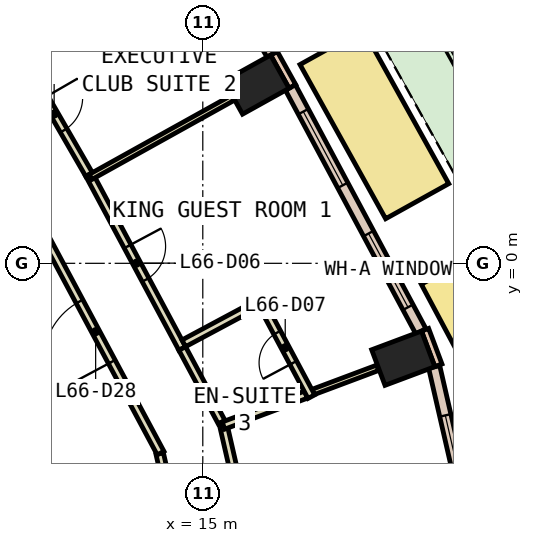
"""IFC4 building model, lengths in metres.
Left out: names, types, materials, properties, quantities, classifications, styles, units other than length and angle.
Written with IfcOpenShell. Run it as: python <this file> out.ifc"""

import sys

from ifc_helpers import new_model, si_unit, direction, frame, frame_2d, origin, origin_2d, place, context, subcontext, project, spatial, rectangle, extrude, element, fill, save


model = new_model("IFC4")
c1 = context("Model", 3, precision=1e-05, world=origin(), true_north=direction((0.0, 1.0)))
c2 = subcontext(c1, "Body", "Model", "MODEL_VIEW")
j1 = project(units=[si_unit("LENGTHUNIT", "METRE"), si_unit("PLANEANGLEUNIT", "RADIAN")], contexts=[c1])
p1 = place(None, origin())
s1 = spatial("IfcSite", under=j1, at=p1, CompositionType="ELEMENT")
p2 = place(p1, origin())
s2 = spatial("IfcBuilding", under=s1, at=p2, CompositionType="ELEMENT")
p3 = place(p2, frame((0.0, 0.0, 286.4)))
s3 = spatial("IfcBuildingStorey", under=s2, at=p3, CompositionType="ELEMENT", Elevation=286.4)
for number, where, z_axis, x_axis in (
    (1, (20.275, -2.497, 0.0), (0.0, 0.0, 1.0), (-0.351, 0.936, 0.0)),
    (2, (16.415, 4.702, 0.0), (0.0, 0.0, 1.0), (-0.486, 0.874, 0.0)),
):
    element("IfcColumn", number, at=place(p3, frame(where, z_axis=z_axis, x_axis=x_axis)), inside=s3, PredefinedType="COLUMN", context=c2, shape_type="SweptSolid", body=[
        extrude(rectangle(XDim=1.0, YDim=1.4, at=origin_2d()), origin(), (0.0, 0.0, 1.0), 3.26),
    ])
p4 = place(p3, frame((6.279, -3.625, -0.6), z_axis=(0.0, 0.0, 1.0), x_axis=(0.866017533419, -0.500013631625, 0.0)))
e3 = element("IfcWall", 3, at=p4, inside=s3, PredefinedType="SHEAR", context=c2, shape_type="SweptSolid", body=[
    extrude(rectangle(XDim=9.0, YDim=0.8, at=frame_2d((4.5, 0.0))), origin(), (0.0, 0.0, 1.0), 3.86),
])
p5 = place(p3, frame((21.2, -2.684, 0.0), z_axis=(0.0, 0.0, 1.0), x_axis=(-0.350962844851, 0.936389385637, 0.0)))
e4 = element("IfcWall", 4, at=p5, inside=s3, PredefinedType="STANDARD", context=c2, shape_type="SweptSolid", body=[
    extrude(rectangle(XDim=1.0, YDim=0.2, at=frame_2d((0.5, 0.0))), origin(), (0.0, 0.0, 1.0), 3.26),
])
p6 = place(p3, frame((17.358, 4.653, 0.0), z_axis=(0.0, 0.0, 1.0), x_axis=(-0.485850211157, 0.874042088414, 0.0)))
e5 = element("IfcWall", 5, at=p6, inside=s3, PredefinedType="STANDARD", context=c2, shape_type="SweptSolid", body=[
    extrude(rectangle(XDim=1.0, YDim=0.2, at=frame_2d((0.5, 0.0))), origin(), (0.0, 0.0, 1.0), 3.26),
])
p7 = place(p3, frame((21.987, -6.642, 0.0), z_axis=(0.0, 0.0, 1.0), x_axis=(-0.223448307338, 0.974715781112, 0.0)))
e6 = element("IfcWall", 6, at=p7, inside=s3, PredefinedType="STANDARD", context=c2, shape_type="SweptSolid", body=[
    extrude(rectangle(XDim=4.019, YDim=0.3, at=frame_2d((2.009, 0.0))), origin(), (0.0, 0.0, 1.0), 3.26),
])
p8 = place(p7, frame((1.309, 0.0, 0.9)))
e7 = element("IfcOpeningElement", 7, at=p8, cuts=e6, PredefinedType="OPENING", context=c2, shape_type="SweptSolid", body=[
    extrude(rectangle(XDim=1.4, YDim=2.0, at=frame_2d((0.7, 1.0))), frame((0.0, 0.16, 0.0), z_axis=(0.0, -1.0, 0.0), x_axis=(1.0, 0.0, 0.0)), (0.0, 0.0, 1.0), 0.32),
])
p9 = place(p3, frame((20.739, -1.79, 0.0), z_axis=(0.0, 0.0, 1.0), x_axis=(-0.471789353675, 0.881711293882, 0.0)))
e8 = element("IfcWall", 8, at=p9, inside=s3, PredefinedType="STANDARD", context=c2, shape_type="SweptSolid", body=[
    extrude(rectangle(XDim=7.277, YDim=0.3, at=frame_2d((3.638, 0.0))), origin(), (0.0, 0.0, 1.0), 3.26),
])
p10 = place(p9, frame((0.719, 0.0, 0.9)))
e9 = element("IfcOpeningElement", 9, at=p10, cuts=e8, PredefinedType="OPENING", context=c2, shape_type="SweptSolid", body=[
    extrude(rectangle(XDim=2.2, YDim=2.0, at=frame_2d((1.1, 1.0))), frame((0.0, 0.16, 0.0), z_axis=(0.0, -1.0, 0.0), x_axis=(1.0, 0.0, 0.0)), (0.0, 0.0, 1.0), 0.32),
])
p11 = place(p9, frame((4.358, 0.0, 0.9)))
e10 = element("IfcOpeningElement", 10, at=p11, cuts=e8, PredefinedType="OPENING", context=c2, shape_type="SweptSolid", body=[
    extrude(rectangle(XDim=2.2, YDim=2.0, at=frame_2d((1.1, 1.0))), frame((0.0, 0.16, 0.0), z_axis=(0.0, -1.0, 0.0), x_axis=(1.0, 0.0, 0.0)), (0.0, 0.0, 1.0), 0.32),
])
p12 = place(p3, frame((16.821, 5.498, 0.0), z_axis=(0.0, 0.0, 1.0), x_axis=(-0.499945412946, 0.866056917341, 0.0)))
e11 = element("IfcWall", 11, at=p12, inside=s3, PredefinedType="STANDARD", context=c2, shape_type="SweptSolid", body=[
    extrude(rectangle(XDim=7.299, YDim=0.3, at=frame_2d((3.649, 0.0))), origin(), (0.0, 0.0, 1.0), 3.26),
])
p13 = place(p12, frame((0.825, 0.0, 0.0)))
e12 = element("IfcOpeningElement", 12, at=p13, cuts=e11, PredefinedType="OPENING", context=c2, shape_type="SweptSolid", body=[
    extrude(rectangle(XDim=2.0, YDim=2.4, at=frame_2d((1.0, 1.2))), frame((0.0, 0.16, 0.0), z_axis=(0.0, -1.0, 0.0), x_axis=(1.0, 0.0, 0.0)), (0.0, 0.0, 1.0), 0.32),
])
p14 = place(p12, frame((4.374, 0.0, 0.9)))
e13 = element("IfcOpeningElement", 13, at=p14, cuts=e11, PredefinedType="OPENING", context=c2, shape_type="SweptSolid", body=[
    extrude(rectangle(XDim=2.2, YDim=2.0, at=frame_2d((1.1, 1.0))), frame((0.0, 0.16, 0.0), z_axis=(0.0, -1.0, 0.0), x_axis=(1.0, 0.0, 0.0)), (0.0, 0.0, 1.0), 0.32),
])
p15 = place(p3, frame((23.847, -4.337, 0.0), z_axis=(0.0, 0.0, 1.0), x_axis=(-0.470902401725, 0.882185313894, 0.0)))
e14 = element("IfcWall", 14, at=p15, inside=s3, PredefinedType="STANDARD", context=c2, shape_type="SweptSolid", body=[
    extrude(rectangle(XDim=4.799, YDim=1.9, at=frame_2d((2.4, 0.0))), origin(), (0.0, 0.0, 1.0), 0.8),
])
p16 = place(p3, frame((20.642, 1.634, 0.0), z_axis=(0.0, 0.0, 1.0), x_axis=(-0.485696527213, 0.874127498397, 0.0)))
e15 = element("IfcWall", 15, at=p16, inside=s3, PredefinedType="STANDARD", context=c2, shape_type="SweptSolid", body=[
    extrude(rectangle(XDim=4.641, YDim=1.9, at=frame_2d((2.321, 0.0))), origin(), (0.0, 0.0, 1.0), 0.8),
])
p17 = place(p3, frame((14.335, -7.052, 0.0), z_axis=(0.0, 0.0, 1.0), x_axis=(-0.22355315143, 0.974691740237, 0.0)))
e16 = element("IfcWall", 16, at=p17, inside=s3, PredefinedType="PARTITIONING", context=c2, shape_type="SweptSolid", body=[
    extrude(rectangle(XDim=2.102, YDim=0.2, at=frame_2d((1.051, 0.0))), origin(), (0.0, 0.0, 1.0), 3.26),
])
p18 = place(p3, frame((13.89, -4.994, 0.0), z_axis=(0.0, 0.0, 1.0), x_axis=(-0.471713767504, 0.881751734644, 0.0)))
e17 = element("IfcWall", 17, at=p18, inside=s3, PredefinedType="PARTITIONING", context=c2, shape_type="SweptSolid", body=[
    extrude(rectangle(XDim=7.248, YDim=0.2, at=frame_2d((3.624, 0.0))), origin(), (0.0, 0.0, 1.0), 3.26),
])
p19 = place(p18, frame((2.724, 0.0, 0.0)))
e18 = element("IfcOpeningElement", 18, at=p19, cuts=e17, PredefinedType="OPENING", context=c2, shape_type="SweptSolid", body=[
    extrude(rectangle(XDim=1.8, YDim=2.1, at=frame_2d((0.9, 1.05))), frame((0.0, 0.11, 0.0), z_axis=(0.0, -1.0, 0.0), x_axis=(1.0, 0.0, 0.0)), (0.0, 0.0, 1.0), 0.22),
])
p20 = place(p3, frame((15.521, -4.171, 0.0), z_axis=(0.0, 0.0, 1.0), x_axis=(0.223416387785, -0.974723097946, 0.0)))
e19 = element("IfcWall", 19, at=p20, inside=s3, PredefinedType="PARTITIONING", context=c2, shape_type="SweptSolid", body=[
    extrude(rectangle(XDim=3.003, YDim=0.2, at=frame_2d((1.501, 0.0))), origin(), (0.0, 0.0, 1.0), 3.26),
])
p21 = place(p3, frame((12.009, 2.338, 0.0), z_axis=(0.0, 0.0, 1.0), x_axis=(0.471771260231, -0.88172097515, 0.0)))
e20 = element("IfcWall", 20, at=p21, inside=s3, PredefinedType="PARTITIONING", context=c2, shape_type="SweptSolid", body=[
    extrude(rectangle(XDim=5.193, YDim=0.2, at=frame_2d((2.597, 0.0))), origin(), (0.0, 0.0, 1.0), 3.26),
])
p22 = place(p21, frame((2.146, 0.0, 0.0)))
e21 = element("IfcOpeningElement", 21, at=p22, cuts=e20, PredefinedType="OPENING", context=c2, shape_type="SweptSolid", body=[
    extrude(rectangle(XDim=1.0, YDim=2.1, at=frame_2d((0.5, 1.05))), frame((0.0, 0.11, 0.0), z_axis=(0.0, -1.0, 0.0), x_axis=(1.0, 0.0, 0.0)), (0.0, 0.0, 1.0), 0.22),
])
p23 = place(p3, frame((14.459, -2.241, 0.0), z_axis=(0.0, 0.0, 1.0), x_axis=(0.471648235011, -0.881786789656, 0.0)))
e22 = element("IfcWall", 22, at=p23, inside=s3, PredefinedType="PARTITIONING", context=c2, shape_type="SweptSolid", body=[
    extrude(rectangle(XDim=2.199, YDim=0.2, at=frame_2d((1.1, 0.0))), origin(), (0.0, 0.0, 1.0), 3.26),
])
p24 = place(p3, frame((10.17, 5.519, 0.0), z_axis=(0.0, 0.0, 1.0), x_axis=(0.499990860175, -0.866030680601, 0.0)))
e23 = element("IfcWall", 23, at=p24, inside=s3, PredefinedType="PARTITIONING", context=c2, shape_type="SweptSolid", body=[
    extrude(rectangle(XDim=3.674, YDim=0.2, at=frame_2d((1.837, 0.0))), origin(), (0.0, 0.0, 1.0), 3.26),
])
p25 = place(p24, frame((1.337, 0.0, 0.0)))
e24 = element("IfcOpeningElement", 24, at=p25, cuts=e23, PredefinedType="OPENING", context=c2, shape_type="SweptSolid", body=[
    extrude(rectangle(XDim=1.0, YDim=2.1, at=frame_2d((0.5, 1.05))), frame((0.0, 0.11, 0.0), z_axis=(0.0, -1.0, 0.0), x_axis=(1.0, 0.0, 0.0)), (0.0, 0.0, 1.0), 0.22),
])
p26 = place(p3, frame((17.904, -3.385, 0.0), z_axis=(0.0, 0.0, 1.0), x_axis=(0.936401128709, 0.350931512054, 0.0)))
e25 = element("IfcWall", 25, at=p26, inside=s3, PredefinedType="PARTITIONING", context=c2, shape_type="SweptSolid", body=[
    extrude(rectangle(XDim=1.812, YDim=0.15, at=frame_2d((0.906, 0.0))), origin(), (0.0, 0.0, 1.0), 3.26),
])
p27 = place(p3, frame((15.544, -4.269, 0.0), z_axis=(0.0, 0.0, 1.0), x_axis=(0.936463142424, 0.350765994477, 0.0)))
e26 = element("IfcWall", 26, at=p27, inside=s3, PredefinedType="PARTITIONING", context=c2, shape_type="SweptSolid", body=[
    extrude(rectangle(XDim=2.321, YDim=0.2, at=frame_2d((1.16, 0.0))), origin(), (0.0, 0.0, 1.0), 3.26),
])
p28 = place(p3, frame((17.857, -3.508, 0.0), z_axis=(0.0, 0.0, 1.0), x_axis=(-0.47112614664, 0.882065844454, 0.0)))
e27 = element("IfcWall", 27, at=p28, inside=s3, PredefinedType="PARTITIONING", context=c2, shape_type="SweptSolid", body=[
    extrude(rectangle(XDim=2.921, YDim=0.2, at=frame_2d((1.46, 0.0))), origin(), (0.0, 0.0, 1.0), 3.26),
])
p29 = place(p28, frame((1.01, 0.0, 0.0)))
e28 = element("IfcOpeningElement", 28, at=p29, cuts=e27, PredefinedType="OPENING", context=c2, shape_type="SweptSolid", body=[
    extrude(rectangle(XDim=0.9, YDim=2.1, at=frame_2d((0.45, 1.05))), frame((0.0, 0.11, 0.0), z_axis=(0.0, -1.0, 0.0), x_axis=(1.0, 0.0, 0.0)), (0.0, 0.0, 1.0), 0.22),
])
p30 = place(p3, frame((16.44, -1.067, 0.0), z_axis=(0.0, 0.0, 1.0), x_axis=(-0.881700916894, -0.471808746367, 0.0)))
e29 = element("IfcWall", 29, at=p30, inside=s3, PredefinedType="PARTITIONING", context=c2, shape_type="SweptSolid", body=[
    extrude(rectangle(XDim=2.2, YDim=0.2, at=frame_2d((1.1, 0.0))), origin(), (0.0, 0.0, 1.0), 3.26),
])
p31 = place(p3, frame((12.045, 2.272, 0.0), z_axis=(0.0, 0.0, 1.0), x_axis=(0.873982340973, 0.485957680943, 0.0)))
e30 = element("IfcWall", 30, at=p31, inside=s3, PredefinedType="PARTITIONING", context=c2, shape_type="SweptSolid", body=[
    extrude(rectangle(XDim=4.28, YDim=0.15, at=frame_2d((2.14, 0.0))), origin(), (0.0, 0.0, 1.0), 3.26),
])
p32 = place(p3, frame((10.306, 5.482, 0.0), z_axis=(0.0, 0.0, 1.0), x_axis=(0.866100915363, 0.499869187296, 0.0)))
e31 = element("IfcWall", 31, at=p32, inside=s3, PredefinedType="PARTITIONING", context=c2, shape_type="SweptSolid", body=[
    extrude(rectangle(XDim=2.401, YDim=0.2, at=frame_2d((1.2, 0.0))), origin(), (0.0, 0.0, 1.0), 3.26),
])
p33 = place(p8, origin())
e32 = element("IfcWindow", 32, at=p33, inside=s3, PartitioningType="SINGLE_PANEL", PredefinedType="WINDOW", context=c2, shape_type="SweptSolid", body=[
    extrude(rectangle(XDim=1.4, YDim=2.0, at=frame_2d((0.7, 1.0))), frame((0.0, 0.03, 0.0), z_axis=(0.0, -1.0, 0.0), x_axis=(1.0, 0.0, 0.0)), (0.0, 0.0, 1.0), 0.06),
])
fill(e7, e32)
p34 = place(p10, origin())
e33 = element("IfcWindow", 33, at=p34, inside=s3, PartitioningType="SINGLE_PANEL", PredefinedType="WINDOW", context=c2, shape_type="SweptSolid", body=[
    extrude(rectangle(XDim=2.2, YDim=2.0, at=frame_2d((1.1, 1.0))), frame((0.0, 0.03, 0.0), z_axis=(0.0, -1.0, 0.0), x_axis=(1.0, 0.0, 0.0)), (0.0, 0.0, 1.0), 0.06),
])
fill(e9, e33)
p35 = place(p11, origin())
e34 = element("IfcWindow", 34, at=p35, inside=s3, PartitioningType="SINGLE_PANEL", PredefinedType="WINDOW", context=c2, shape_type="SweptSolid", body=[
    extrude(rectangle(XDim=2.2, YDim=2.0, at=frame_2d((1.1, 1.0))), frame((0.0, 0.03, 0.0), z_axis=(0.0, -1.0, 0.0), x_axis=(1.0, 0.0, 0.0)), (0.0, 0.0, 1.0), 0.06),
])
fill(e10, e34)
p36 = place(p22, origin())
e35 = element("IfcDoor", 35, at=p36, inside=s3, OperationType="SINGLE_SWING_LEFT", PredefinedType="DOOR", context=c2, shape_type="SweptSolid", body=[
    extrude(rectangle(XDim=1.0, YDim=2.1, at=frame_2d((0.5, 1.05))), frame((0.0, 0.025, 0.0), z_axis=(0.0, -1.0, 0.0), x_axis=(1.0, 0.0, 0.0)), (0.0, 0.0, 1.0), 0.05),
])
fill(e21, e35)
p37 = place(p29, origin())
e36 = element("IfcDoor", 36, at=p37, inside=s3, OperationType="SINGLE_SWING_RIGHT", PredefinedType="DOOR", context=c2, shape_type="SweptSolid", body=[
    extrude(rectangle(XDim=0.9, YDim=2.1, at=frame_2d((0.45, 1.05))), frame((0.0, 0.025, 0.0), z_axis=(0.0, -1.0, 0.0), x_axis=(1.0, 0.0, 0.0)), (0.0, 0.0, 1.0), 0.05),
])
fill(e28, e36)
p38 = place(p25, origin())
e37 = element("IfcDoor", 37, at=p38, inside=s3, OperationType="SINGLE_SWING_LEFT", PredefinedType="DOOR", context=c2, shape_type="SweptSolid", body=[
    extrude(rectangle(XDim=1.0, YDim=2.1, at=frame_2d((0.5, 1.05))), frame((0.0, 0.025, 0.0), z_axis=(0.0, -1.0, 0.0), x_axis=(1.0, 0.0, 0.0)), (0.0, 0.0, 1.0), 0.05),
])
fill(e24, e37)
p39 = place(p19, origin())
e38 = element("IfcDoor", 38, at=p39, inside=s3, OperationType="DOUBLE_DOOR_SINGLE_SWING", PredefinedType="DOOR", context=c2, shape_type="SweptSolid", body=[
    extrude(rectangle(XDim=1.8, YDim=2.1, at=frame_2d((0.9, 1.05))), frame((0.0, 0.025, 0.0), z_axis=(0.0, -1.0, 0.0), x_axis=(1.0, 0.0, 0.0)), (0.0, 0.0, 1.0), 0.05),
])
fill(e18, e38)
save(model, sys.argv[1])
